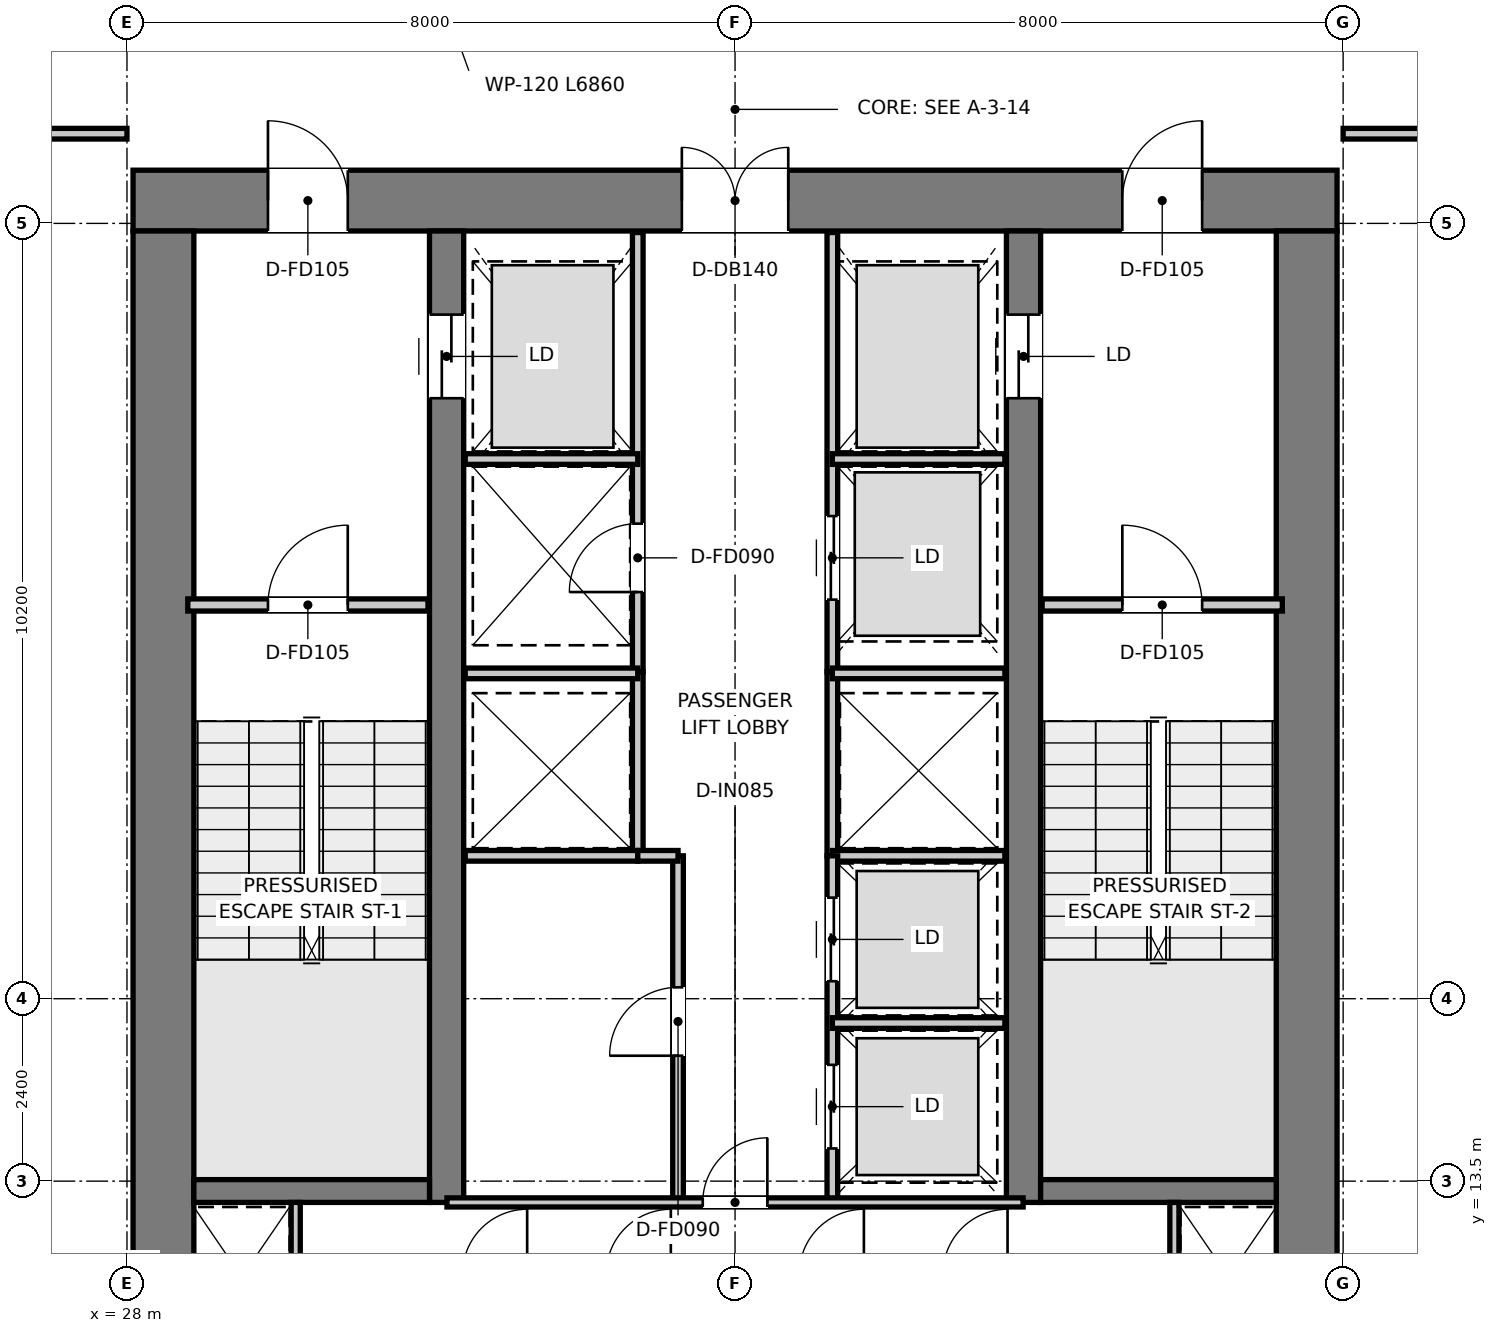
"""IFC4 building model, lengths in metres.
Left out: names, types, materials, properties, quantities, classifications, styles, units other than length and angle.
Written with IfcOpenShell. Run it as: python <this file> out.ifc"""

import sys

from ifc_helpers import new_model, si_unit, direction, frame, frame_2d, origin, place, context, subcontext, project, spatial, rectangle, extrude, element, fill, save


model = new_model("IFC4")
c1 = context("Model", 3, precision=1e-05, world=origin(), true_north=direction((0.0, 1.0)))
c2 = subcontext(c1, "Body", "Model", "MODEL_VIEW")
j1 = project(units=[si_unit("LENGTHUNIT", "METRE"), si_unit("PLANEANGLEUNIT", "RADIAN")], contexts=[c1])
p1 = place(None, origin())
s1 = spatial("IfcSite", under=j1, at=p1, CompositionType="ELEMENT")
p2 = place(p1, origin())
s2 = spatial("IfcBuilding", under=s1, at=p2, CompositionType="ELEMENT")
p3 = place(p2, frame((0.0, 0.0, 185.7)))
s3 = spatial("IfcBuildingStorey", under=s2, at=p3, CompositionType="ELEMENT", Elevation=185.7)
p4 = place(p3, frame((28.08, 26.4, 0.0), z_axis=(0.0, 0.0, 1.0), x_axis=(1.0, 0.0, 0.0)))
e1 = element("IfcWall", 1, at=p4, inside=s3, PredefinedType="SHEAR", context=c2, shape_type="SweptSolid", body=[
    extrude(rectangle(XDim=15.84, YDim=0.8, at=frame_2d((7.92, 0.0))), origin(), (0.0, 0.0, 1.0), 3.95),
])
p5 = place(p4, frame((7.22, 0.0, 0.0)))
e2 = element("IfcOpeningElement", 2, at=p5, cuts=e1, PredefinedType="OPENING", context=c2, shape_type="SweptSolid", body=[
    extrude(rectangle(XDim=1.4, YDim=2.2, at=frame_2d((0.7, 1.1))), frame((0.0, 0.41, 0.0), z_axis=(0.0, -1.0, 0.0), x_axis=(1.0, 0.0, 0.0)), (0.0, 0.0, 1.0), 0.82),
])
p6 = place(p4, frame((1.775, 0.0, 0.0)))
e3 = element("IfcOpeningElement", 3, at=p6, cuts=e1, PredefinedType="OPENING", context=c2, shape_type="SweptSolid", body=[
    extrude(rectangle(XDim=1.05, YDim=2.1, at=frame_2d((0.525, 1.05))), frame((0.0, 0.41, 0.0), z_axis=(0.0, -1.0, 0.0), x_axis=(1.0, 0.0, 0.0)), (0.0, 0.0, 1.0), 0.82),
])
p7 = place(p4, frame((13.015, 0.0, 0.0)))
e4 = element("IfcOpeningElement", 4, at=p7, cuts=e1, PredefinedType="OPENING", context=c2, shape_type="SweptSolid", body=[
    extrude(rectangle(XDim=1.05, YDim=2.1, at=frame_2d((0.525, 1.05))), frame((0.0, 0.41, 0.0), z_axis=(0.0, -1.0, 0.0), x_axis=(1.0, 0.0, 0.0)), (0.0, 0.0, 1.0), 0.82),
])
for number, where, z_axis, x_axis in (
    (5, (28.48, 11.3, 0.0), (0.0, 0.0, 1.0), (0.0, 1.0, 0.0)),
    (6, (43.52, 11.3, 0.0), (0.0, 0.0, 1.0), (0.0, 1.0, 0.0)),
):
    element("IfcWall", number, at=place(p3, frame(where, z_axis=z_axis, x_axis=x_axis)), inside=s3, PredefinedType="SHEAR", context=c2, shape_type="SweptSolid", body=[
        extrude(rectangle(XDim=14.7, YDim=0.8, at=frame_2d((7.35, 0.0))), origin(), (0.0, 0.0, 1.0), 3.95),
    ])
p8 = place(p3, frame((32.205, 13.22, 0.0), z_axis=(0.0, 0.0, 1.0), x_axis=(0.0, 1.0, 0.0)))
e7 = element("IfcWall", 7, at=p8, inside=s3, PredefinedType="SHEAR", context=c2, shape_type="SweptSolid", body=[
    extrude(rectangle(XDim=12.78, YDim=0.45, at=frame_2d((6.39, 0.0))), origin(), (0.0, 0.0, 1.0), 3.95),
])
p9 = place(p8, frame((10.58, 0.0, 0.0)))
e8 = element("IfcOpeningElement", 8, at=p9, cuts=e7, PredefinedType="OPENING", context=c2, shape_type="SweptSolid", body=[
    extrude(rectangle(XDim=1.1, YDim=2.15, at=frame_2d((0.55, 1.075))), frame((0.0, 0.235, 0.0), z_axis=(0.0, -1.0, 0.0), x_axis=(1.0, 0.0, 0.0)), (0.0, 0.0, 1.0), 0.47),
])
p10 = place(p3, frame((39.795, 13.22, 0.0), z_axis=(0.0, 0.0, 1.0), x_axis=(0.0, 1.0, 0.0)))
e9 = element("IfcWall", 9, at=p10, inside=s3, PredefinedType="SHEAR", context=c2, shape_type="SweptSolid", body=[
    extrude(rectangle(XDim=12.78, YDim=0.45, at=frame_2d((6.39, 0.0))), origin(), (0.0, 0.0, 1.0), 3.95),
])
p11 = place(p10, frame((10.58, 0.0, 0.0)))
e10 = element("IfcOpeningElement", 10, at=p11, cuts=e9, PredefinedType="OPENING", context=c2, shape_type="SweptSolid", body=[
    extrude(rectangle(XDim=1.1, YDim=2.15, at=frame_2d((0.55, 1.075))), frame((0.0, 0.235, 0.0), z_axis=(0.0, -1.0, 0.0), x_axis=(1.0, 0.0, 0.0)), (0.0, 0.0, 1.0), 0.47),
])
for number, where, z_axis, x_axis in (
    (11, (28.88, 13.37, 0.0), (0.0, 0.0, 1.0), (1.0, 0.0, 0.0)),
    (12, (40.02, 13.37, 0.0), (0.0, 0.0, 1.0), (1.0, 0.0, 0.0)),
):
    element("IfcWall", number, at=place(p3, frame(where, z_axis=z_axis, x_axis=x_axis)), inside=s3, PredefinedType="SHEAR", context=c2, shape_type="SweptSolid", body=[
        extrude(rectangle(XDim=3.1, YDim=0.3, at=frame_2d((1.55, 0.0))), origin(), (0.0, 0.0, 1.0), 3.95),
    ])
p12 = place(p3, frame((28.8, 21.08, 0.0), z_axis=(0.0, 0.0, 1.0), x_axis=(1.0, 0.0, 0.0)))
e13 = element("IfcWall", 13, at=p12, inside=s3, PredefinedType="PARTITIONING", context=c2, shape_type="SweptSolid", body=[
    extrude(rectangle(XDim=3.16, YDim=0.16, at=frame_2d((1.58, 0.0))), origin(), (0.0, 0.0, 1.0), 3.67),
])
p13 = place(p12, frame((1.055, 0.0, 0.0)))
e14 = element("IfcOpeningElement", 14, at=p13, cuts=e13, PredefinedType="OPENING", context=c2, shape_type="SweptSolid", body=[
    extrude(rectangle(XDim=1.05, YDim=2.1, at=frame_2d((0.525, 1.05))), frame((0.0, 0.09, 0.0), z_axis=(0.0, -1.0, 0.0), x_axis=(1.0, 0.0, 0.0)), (0.0, 0.0, 1.0), 0.18),
])
p14 = place(p3, frame((40.04, 21.08, 0.0), z_axis=(0.0, 0.0, 1.0), x_axis=(1.0, 0.0, 0.0)))
e15 = element("IfcWall", 15, at=p14, inside=s3, PredefinedType="PARTITIONING", context=c2, shape_type="SweptSolid", body=[
    extrude(rectangle(XDim=3.16, YDim=0.16, at=frame_2d((1.58, 0.0))), origin(), (0.0, 0.0, 1.0), 3.67),
])
p15 = place(p14, frame((1.055, 0.0, 0.0)))
e16 = element("IfcOpeningElement", 16, at=p15, cuts=e15, PredefinedType="OPENING", context=c2, shape_type="SweptSolid", body=[
    extrude(rectangle(XDim=1.05, YDim=2.1, at=frame_2d((0.525, 1.05))), frame((0.0, 0.09, 0.0), z_axis=(0.0, -1.0, 0.0), x_axis=(1.0, 0.0, 0.0)), (0.0, 0.0, 1.0), 0.18),
])
p16 = place(p3, frame((34.72, 20.2, 0.0), z_axis=(0.0, 0.0, 1.0), x_axis=(0.0, 1.0, 0.0)))
e17 = element("IfcWall", 17, at=p16, inside=s3, PredefinedType="PARTITIONING", context=c2, shape_type="SweptSolid", body=[
    extrude(rectangle(XDim=5.78, YDim=0.14, at=frame_2d((2.89, 0.0))), origin(), (0.0, 0.0, 1.0), 2.67),
])
p17 = place(p16, frame((1.05, 0.0, 0.0)))
e18 = element("IfcOpeningElement", 18, at=p17, cuts=e17, PredefinedType="OPENING", context=c2, shape_type="SweptSolid", body=[
    extrude(rectangle(XDim=0.9, YDim=2.1, at=frame_2d((0.45, 1.05))), frame((0.0, 0.08, 0.0), z_axis=(0.0, -1.0, 0.0), x_axis=(1.0, 0.0, 0.0)), (0.0, 0.0, 1.0), 0.16),
])
p18 = place(p3, frame((37.28, 20.2, 0.0), z_axis=(0.0, 0.0, 1.0), x_axis=(0.0, 1.0, 0.0)))
e19 = element("IfcWall", 19, at=p18, inside=s3, PredefinedType="PARTITIONING", context=c2, shape_type="SweptSolid", body=[
    extrude(rectangle(XDim=5.78, YDim=0.14, at=frame_2d((2.89, 0.0))), origin(), (0.0, 0.0, 1.0), 2.67),
])
p19 = place(p18, frame((0.95, 0.0, 0.0)))
e20 = element("IfcOpeningElement", 20, at=p19, cuts=e19, PredefinedType="OPENING", context=c2, shape_type="SweptSolid", body=[
    extrude(rectangle(XDim=1.1, YDim=2.15, at=frame_2d((0.55, 1.075))), frame((0.0, 0.08, 0.0), z_axis=(0.0, -1.0, 0.0), x_axis=(1.0, 0.0, 0.0)), (0.0, 0.0, 1.0), 0.16),
])
for number, where, z_axis, x_axis in (
    (21, (32.45, 23.0, 0.0), (0.0, 0.0, 1.0), (1.0, 0.0, 0.0)),
    (22, (37.28, 23.0, 0.0), (0.0, 0.0, 1.0), (1.0, 0.0, 0.0)),
):
    element("IfcWall", number, at=place(p3, frame(where, z_axis=z_axis, x_axis=x_axis)), inside=s3, PredefinedType="PARTITIONING", context=c2, shape_type="SweptSolid", body=[
        extrude(rectangle(XDim=2.27, YDim=0.14, at=frame_2d((1.135, 0.0))), origin(), (0.0, 0.0, 1.0), 2.67),
    ])
for number, where, z_axis, x_axis in (
    (23, (34.72, 17.78, 0.0), (0.0, 0.0, 1.0), (0.0, 1.0, 0.0)),
    (24, (37.28, 17.78, 0.0), (0.0, 0.0, 1.0), (0.0, 1.0, 0.0)),
):
    element("IfcWall", number, at=place(p3, frame(where, z_axis=z_axis, x_axis=x_axis)), inside=s3, PredefinedType="PARTITIONING", context=c2, shape_type="SweptSolid", body=[
        extrude(rectangle(XDim=2.42, YDim=0.14, at=frame_2d((1.21, 0.0))), origin(), (0.0, 0.0, 1.0), 3.67),
    ])
for number, where, z_axis, x_axis in (
    (25, (32.45, 17.78, 0.0), (0.0, 0.0, 1.0), (1.0, 0.0, 0.0)),
    (26, (32.45, 20.18, 0.0), (0.0, 0.0, 1.0), (1.0, 0.0, 0.0)),
    (27, (37.28, 17.78, 0.0), (0.0, 0.0, 1.0), (1.0, 0.0, 0.0)),
    (28, (37.28, 20.18, 0.0), (0.0, 0.0, 1.0), (1.0, 0.0, 0.0)),
):
    element("IfcWall", number, at=place(p3, frame(where, z_axis=z_axis, x_axis=x_axis)), inside=s3, PredefinedType="PARTITIONING", context=c2, shape_type="SweptSolid", body=[
        extrude(rectangle(XDim=2.27, YDim=0.14, at=frame_2d((1.135, 0.0))), origin(), (0.0, 0.0, 1.0), 3.67),
    ])
p20 = place(p3, frame((35.25, 13.22, 0.0), z_axis=(0.0, 0.0, 1.0), x_axis=(0.0, 1.0, 0.0)))
e29 = element("IfcWall", 29, at=p20, inside=s3, PredefinedType="PARTITIONING", context=c2, shape_type="SweptSolid", body=[
    extrude(rectangle(XDim=4.56, YDim=0.14, at=frame_2d((2.28, 0.0))), origin(), (0.0, 0.0, 1.0), 3.67),
])
p21 = place(p20, frame((1.93, 0.0, 0.0)))
e30 = element("IfcOpeningElement", 30, at=p21, cuts=e29, PredefinedType="OPENING", context=c2, shape_type="SweptSolid", body=[
    extrude(rectangle(XDim=0.9, YDim=2.1, at=frame_2d((0.45, 1.05))), frame((0.0, 0.08, 0.0), z_axis=(0.0, -1.0, 0.0), x_axis=(1.0, 0.0, 0.0)), (0.0, 0.0, 1.0), 0.16),
])
p22 = place(p3, frame((34.72, 17.78, 0.0), z_axis=(0.0, 0.0, 1.0), x_axis=(1.0, 0.0, 0.0)))
e31 = element("IfcWall", 31, at=p22, inside=s3, PredefinedType="PARTITIONING", context=c2, shape_type="SweptSolid", body=[
    extrude(rectangle(XDim=0.53, YDim=0.14, at=frame_2d((0.265, 0.0))), origin(), (0.0, 0.0, 1.0), 3.67),
])
p23 = place(p3, frame((37.28, 13.22, 0.0), z_axis=(0.0, 0.0, 1.0), x_axis=(0.0, 1.0, 0.0)))
e32 = element("IfcWall", 32, at=p23, inside=s3, PredefinedType="PARTITIONING", context=c2, shape_type="SweptSolid", body=[
    extrude(rectangle(XDim=4.56, YDim=0.14, at=frame_2d((2.28, 0.0))), origin(), (0.0, 0.0, 1.0), 3.67),
])
p24 = place(p23, frame((0.71, 0.0, 0.0)))
e33 = element("IfcOpeningElement", 33, at=p24, cuts=e32, PredefinedType="OPENING", context=c2, shape_type="SweptSolid", body=[
    extrude(rectangle(XDim=1.1, YDim=2.15, at=frame_2d((0.55, 1.075))), frame((0.0, 0.08, 0.0), z_axis=(0.0, -1.0, 0.0), x_axis=(1.0, 0.0, 0.0)), (0.0, 0.0, 1.0), 0.16),
])
p25 = place(p23, frame((2.91, 0.0, 0.0)))
e34 = element("IfcOpeningElement", 34, at=p25, cuts=e32, PredefinedType="OPENING", context=c2, shape_type="SweptSolid", body=[
    extrude(rectangle(XDim=1.1, YDim=2.15, at=frame_2d((0.55, 1.075))), frame((0.0, 0.08, 0.0), z_axis=(0.0, -1.0, 0.0), x_axis=(1.0, 0.0, 0.0)), (0.0, 0.0, 1.0), 0.16),
])
p26 = place(p3, frame((37.28, 15.58, 0.0), z_axis=(0.0, 0.0, 1.0), x_axis=(1.0, 0.0, 0.0)))
e35 = element("IfcWall", 35, at=p26, inside=s3, PredefinedType="PARTITIONING", context=c2, shape_type="SweptSolid", body=[
    extrude(rectangle(XDim=2.27, YDim=0.14, at=frame_2d((1.135, 0.0))), origin(), (0.0, 0.0, 1.0), 3.67),
])
for number, where, z_axis, x_axis in (
    (36, (30.22, 11.25, 0.0), (0.0, 0.0, 1.0), (0.0, 1.0, 0.0)),
    (37, (41.78, 11.25, 0.0), (0.0, 0.0, 1.0), (0.0, 1.0, 0.0)),
):
    element("IfcWall", number, at=place(p3, frame(where, z_axis=z_axis, x_axis=x_axis)), inside=s3, PredefinedType="PARTITIONING", context=c2, shape_type="SweptSolid", body=[
        extrude(rectangle(XDim=1.97, YDim=0.12, at=frame_2d((0.985, 0.0))), origin(), (0.0, 0.0, 1.0), 3.67),
    ])
p27 = place(p3, frame((32.21, 13.22, 0.0), z_axis=(0.0, 0.0, 1.0), x_axis=(1.0, 0.0, 0.0)))
e38 = element("IfcWall", 38, at=p27, inside=s3, PredefinedType="PARTITIONING", context=c2, shape_type="SweptSolid", body=[
    extrude(rectangle(XDim=7.58, YDim=0.12, at=frame_2d((3.79, 0.0))), origin(), (0.0, 0.0, 1.0), 3.67),
])
p28 = place(p27, frame((3.365, 0.0, 0.0)))
e39 = element("IfcOpeningElement", 39, at=p28, cuts=e38, PredefinedType="OPENING", context=c2, shape_type="SweptSolid", body=[
    extrude(rectangle(XDim=0.85, YDim=2.1, at=frame_2d((0.425, 1.05))), frame((0.0, 0.07, 0.0), z_axis=(0.0, -1.0, 0.0), x_axis=(1.0, 0.0, 0.0)), (0.0, 0.0, 1.0), 0.14),
])
p29 = place(p3, frame((10.083, 27.28, 0.0), z_axis=(0.0, 0.0, 1.0), x_axis=(1.0, 0.0, 0.0)))
e40 = element("IfcWall", 40, at=p29, inside=s3, PredefinedType="PARTITIONING", context=c2, shape_type="SweptSolid", body=[
    extrude(rectangle(XDim=17.917, YDim=0.14, at=frame_2d((8.958, 0.0))), origin(), (0.0, 0.0, 1.0), 3.03),
])
p30 = place(p29, frame((3.677, 0.0, 0.0)))
e41 = element("IfcOpeningElement", 41, at=p30, cuts=e40, PredefinedType="OPENING", context=c2, shape_type="SweptSolid", body=[
    extrude(rectangle(XDim=0.9, YDim=2.1, at=frame_2d((0.45, 1.05))), frame((0.0, 0.08, 0.0), z_axis=(0.0, -1.0, 0.0), x_axis=(1.0, 0.0, 0.0)), (0.0, 0.0, 1.0), 0.16),
])
p31 = place(p29, frame((12.266, 0.0, 0.0)))
e42 = element("IfcOpeningElement", 42, at=p31, cuts=e40, PredefinedType="OPENING", context=c2, shape_type="SweptSolid", body=[
    extrude(rectangle(XDim=0.9, YDim=2.1, at=frame_2d((0.45, 1.05))), frame((0.0, 0.08, 0.0), z_axis=(0.0, -1.0, 0.0), x_axis=(1.0, 0.0, 0.0)), (0.0, 0.0, 1.0), 0.16),
])
p32 = place(p29, frame((15.167, 0.0, 0.0)))
e43 = element("IfcOpeningElement", 43, at=p32, cuts=e40, PredefinedType="OPENING", context=c2, shape_type="SweptSolid", body=[
    extrude(rectangle(XDim=0.9, YDim=2.1, at=frame_2d((0.45, 1.05))), frame((0.0, 0.08, 0.0), z_axis=(0.0, -1.0, 0.0), x_axis=(1.0, 0.0, 0.0)), (0.0, 0.0, 1.0), 0.16),
])
p33 = place(p3, frame((44.0, 27.28, 0.0), z_axis=(0.0, 0.0, 1.0), x_axis=(1.0, 0.0, 0.0)))
e44 = element("IfcWall", 44, at=p33, inside=s3, PredefinedType="PARTITIONING", context=c2, shape_type="SweptSolid", body=[
    extrude(rectangle(XDim=18.699, YDim=0.14, at=frame_2d((9.349, 0.0))), origin(), (0.0, 0.0, 1.0), 3.03),
])
p34 = place(p33, frame((1.85, 0.0, 0.0)))
e45 = element("IfcOpeningElement", 45, at=p34, cuts=e44, PredefinedType="OPENING", context=c2, shape_type="SweptSolid", body=[
    extrude(rectangle(XDim=0.9, YDim=2.1, at=frame_2d((0.45, 1.05))), frame((0.0, 0.08, 0.0), z_axis=(0.0, -1.0, 0.0), x_axis=(1.0, 0.0, 0.0)), (0.0, 0.0, 1.0), 0.16),
])
p35 = place(p33, frame((4.75, 0.0, 0.0)))
e46 = element("IfcOpeningElement", 46, at=p35, cuts=e44, PredefinedType="OPENING", context=c2, shape_type="SweptSolid", body=[
    extrude(rectangle(XDim=0.9, YDim=2.1, at=frame_2d((0.45, 1.05))), frame((0.0, 0.08, 0.0), z_axis=(0.0, -1.0, 0.0), x_axis=(1.0, 0.0, 0.0)), (0.0, 0.0, 1.0), 0.16),
])
p36 = place(p33, frame((13.34, 0.0, 0.0)))
e47 = element("IfcOpeningElement", 47, at=p36, cuts=e44, PredefinedType="OPENING", context=c2, shape_type="SweptSolid", body=[
    extrude(rectangle(XDim=0.9, YDim=2.1, at=frame_2d((0.45, 1.05))), frame((0.0, 0.08, 0.0), z_axis=(0.0, -1.0, 0.0), x_axis=(1.0, 0.0, 0.0)), (0.0, 0.0, 1.0), 0.16),
])
p37 = place(p13, origin())
e48 = element("IfcDoor", 48, at=p37, inside=s3, OperationType="SINGLE_SWING_RIGHT", PredefinedType="DOOR", context=c2, shape_type="SweptSolid", body=[
    extrude(rectangle(XDim=1.05, YDim=2.1, at=frame_2d((0.525, 1.05))), frame((0.0, 0.025, 0.0), z_axis=(0.0, -1.0, 0.0), x_axis=(1.0, 0.0, 0.0)), (0.0, 0.0, 1.0), 0.05),
])
fill(e14, e48)
p38 = place(p15, origin())
e49 = element("IfcDoor", 49, at=p38, inside=s3, OperationType="SINGLE_SWING_LEFT", PredefinedType="DOOR", context=c2, shape_type="SweptSolid", body=[
    extrude(rectangle(XDim=1.05, YDim=2.1, at=frame_2d((0.525, 1.05))), frame((0.0, 0.025, 0.0), z_axis=(0.0, -1.0, 0.0), x_axis=(1.0, 0.0, 0.0)), (0.0, 0.0, 1.0), 0.05),
])
fill(e16, e49)
p39 = place(p5, origin())
e50 = element("IfcDoor", 50, at=p39, inside=s3, OperationType="DOUBLE_DOOR_SINGLE_SWING", PredefinedType="DOOR", context=c2, shape_type="SweptSolid", body=[
    extrude(rectangle(XDim=1.4, YDim=2.2, at=frame_2d((0.7, 1.1))), frame((0.0, 0.025, 0.0), z_axis=(0.0, -1.0, 0.0), x_axis=(1.0, 0.0, 0.0)), (0.0, 0.0, 1.0), 0.05),
])
fill(e2, e50)
p40 = place(p6, origin())
e51 = element("IfcDoor", 51, at=p40, inside=s3, OperationType="SINGLE_SWING_LEFT", PredefinedType="DOOR", context=c2, shape_type="SweptSolid", body=[
    extrude(rectangle(XDim=1.05, YDim=2.1, at=frame_2d((0.525, 1.05))), frame((0.0, 0.025, 0.0), z_axis=(0.0, -1.0, 0.0), x_axis=(1.0, 0.0, 0.0)), (0.0, 0.0, 1.0), 0.05),
])
fill(e3, e51)
p41 = place(p7, origin())
e52 = element("IfcDoor", 52, at=p41, inside=s3, OperationType="SINGLE_SWING_RIGHT", PredefinedType="DOOR", context=c2, shape_type="SweptSolid", body=[
    extrude(rectangle(XDim=1.05, YDim=2.1, at=frame_2d((0.525, 1.05))), frame((0.0, 0.025, 0.0), z_axis=(0.0, -1.0, 0.0), x_axis=(1.0, 0.0, 0.0)), (0.0, 0.0, 1.0), 0.05),
])
fill(e4, e52)
p42 = place(p9, origin())
e53 = element("IfcDoor", 53, at=p42, inside=s3, OperationType="DOUBLE_DOOR_SLIDING", PredefinedType="DOOR", context=c2, shape_type="SweptSolid", body=[
    extrude(rectangle(XDim=1.1, YDim=2.15, at=frame_2d((0.55, 1.075))), frame((0.0, 0.025, 0.0), z_axis=(0.0, -1.0, 0.0), x_axis=(1.0, 0.0, 0.0)), (0.0, 0.0, 1.0), 0.05),
])
fill(e8, e53)
p43 = place(p11, origin())
e54 = element("IfcDoor", 54, at=p43, inside=s3, OperationType="DOUBLE_DOOR_SLIDING", PredefinedType="DOOR", context=c2, shape_type="SweptSolid", body=[
    extrude(rectangle(XDim=1.1, YDim=2.15, at=frame_2d((0.55, 1.075))), frame((0.0, 0.025, 0.0), z_axis=(0.0, -1.0, 0.0), x_axis=(1.0, 0.0, 0.0)), (0.0, 0.0, 1.0), 0.05),
])
fill(e10, e54)
p44 = place(p17, origin())
e55 = element("IfcDoor", 55, at=p44, inside=s3, OperationType="SINGLE_SWING_LEFT", PredefinedType="DOOR", context=c2, shape_type="SweptSolid", body=[
    extrude(rectangle(XDim=0.9, YDim=2.1, at=frame_2d((0.45, 1.05))), frame((0.0, 0.025, 0.0), z_axis=(0.0, -1.0, 0.0), x_axis=(1.0, 0.0, 0.0)), (0.0, 0.0, 1.0), 0.05),
])
fill(e18, e55)
p45 = place(p19, origin())
e56 = element("IfcDoor", 56, at=p45, inside=s3, OperationType="DOUBLE_DOOR_SLIDING", PredefinedType="DOOR", context=c2, shape_type="SweptSolid", body=[
    extrude(rectangle(XDim=1.1, YDim=2.15, at=frame_2d((0.55, 1.075))), frame((0.0, 0.025, 0.0), z_axis=(0.0, -1.0, 0.0), x_axis=(1.0, 0.0, 0.0)), (0.0, 0.0, 1.0), 0.05),
])
fill(e20, e56)
p46 = place(p21, origin())
e57 = element("IfcDoor", 57, at=p46, inside=s3, OperationType="SINGLE_SWING_LEFT", PredefinedType="DOOR", context=c2, shape_type="SweptSolid", body=[
    extrude(rectangle(XDim=0.9, YDim=2.1, at=frame_2d((0.45, 1.05))), frame((0.0, 0.025, 0.0), z_axis=(0.0, -1.0, 0.0), x_axis=(1.0, 0.0, 0.0)), (0.0, 0.0, 1.0), 0.05),
])
fill(e30, e57)
p47 = place(p24, origin())
e58 = element("IfcDoor", 58, at=p47, inside=s3, OperationType="DOUBLE_DOOR_SLIDING", PredefinedType="DOOR", context=c2, shape_type="SweptSolid", body=[
    extrude(rectangle(XDim=1.1, YDim=2.15, at=frame_2d((0.55, 1.075))), frame((0.0, 0.025, 0.0), z_axis=(0.0, -1.0, 0.0), x_axis=(1.0, 0.0, 0.0)), (0.0, 0.0, 1.0), 0.05),
])
fill(e33, e58)
p48 = place(p25, origin())
e59 = element("IfcDoor", 59, at=p48, inside=s3, OperationType="DOUBLE_DOOR_SLIDING", PredefinedType="DOOR", context=c2, shape_type="SweptSolid", body=[
    extrude(rectangle(XDim=1.1, YDim=2.15, at=frame_2d((0.55, 1.075))), frame((0.0, 0.025, 0.0), z_axis=(0.0, -1.0, 0.0), x_axis=(1.0, 0.0, 0.0)), (0.0, 0.0, 1.0), 0.05),
])
fill(e34, e59)
p49 = place(p28, origin())
e60 = element("IfcDoor", 60, at=p49, inside=s3, OperationType="SINGLE_SWING_RIGHT", PredefinedType="DOOR", context=c2, shape_type="SweptSolid", body=[
    extrude(rectangle(XDim=0.85, YDim=2.1, at=frame_2d((0.425, 1.05))), frame((0.0, 0.025, 0.0), z_axis=(0.0, -1.0, 0.0), x_axis=(1.0, 0.0, 0.0)), (0.0, 0.0, 1.0), 0.05),
])
fill(e39, e60)
save(model, sys.argv[1])
